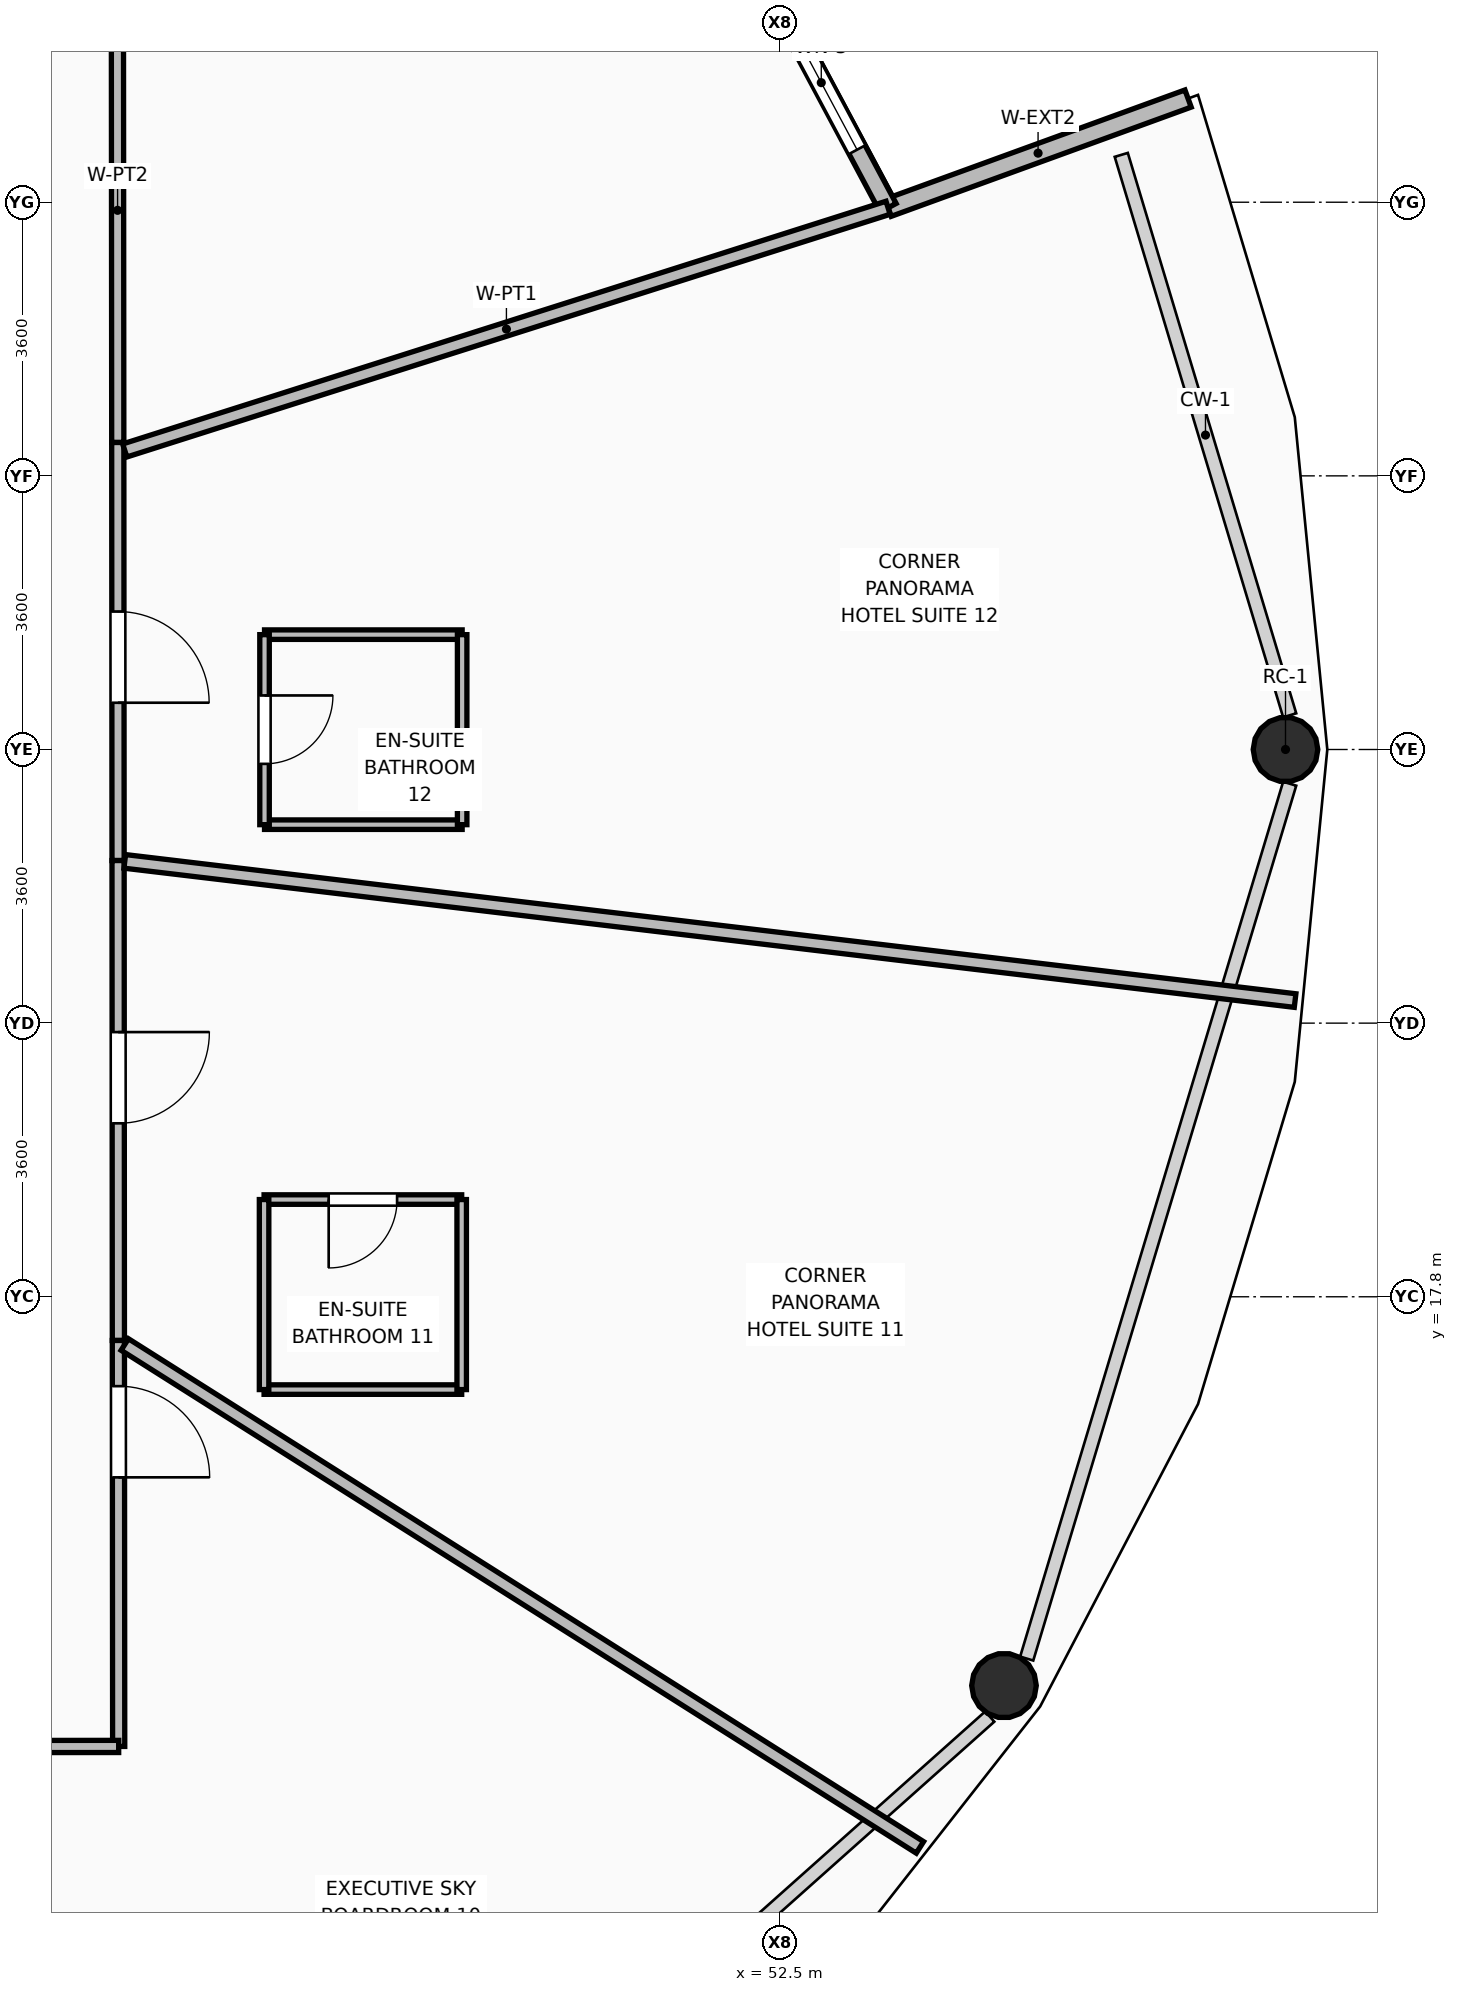
"""IFC4 building model, lengths in metres.
Left out: names, types, materials, properties, quantities, classifications, styles, units other than length and angle.
Written with IfcOpenShell. Run it as: python <this file> out.ifc"""

import sys

from ifc_helpers import new_model, si_unit, direction, frame, frame_2d, origin, origin_2d, place, context, subcontext, project, spatial, rectangle, hollow_circle, extrude, element, fill, save


model = new_model("IFC4")
c1 = context("Model", 3, precision=1e-05, world=origin(), true_north=direction((0.0, 1.0)))
c2 = subcontext(c1, "Body", "Model", "MODEL_VIEW")
j1 = project(units=[si_unit("LENGTHUNIT", "METRE"), si_unit("PLANEANGLEUNIT", "RADIAN")], contexts=[c1])
p1 = place(None, origin())
s1 = spatial("IfcSite", under=j1, at=p1, CompositionType="ELEMENT")
p2 = place(p1, origin())
s2 = spatial("IfcBuilding", under=s1, at=p2, CompositionType="ELEMENT")
p3 = place(p2, frame((0.0, 0.0, 75.75)))
s3 = spatial("IfcBuildingStorey", under=s2, at=p3, CompositionType="ELEMENT", Elevation=75.75)
p4 = place(p3, frame((59.15, 25.0, 0.0), z_axis=(-0.041951682921, 0.0, 0.999119640634), x_axis=(0.0, -1.0, 0.0)))
e1 = element("IfcColumn", 1, at=p4, inside=s3, PredefinedType="COLUMN", context=c2, shape_type="SweptSolid", body=[
    extrude(hollow_circle(Radius=0.425, WallThickness=0.04, at=origin_2d()), origin(), (0.0, 0.0, 1.0), 3.573),
])
p5 = place(p3, frame((55.446, 12.685, 0.0), z_axis=(-0.03641885619, 0.018721888548, 0.999161227132), x_axis=(-0.457197196227, -0.889365348865, 0.0)))
e2 = element("IfcColumn", 2, at=p5, inside=s3, PredefinedType="COLUMN", context=c2, shape_type="SweptSolid", body=[
    extrude(hollow_circle(Radius=0.425, WallThickness=0.04, at=origin_2d()), origin(), (0.0, 0.0, 1.0), 3.573),
])
p6 = place(p3, frame((57.868, 33.564, 0.0), z_axis=(0.0, 0.0, 1.0), x_axis=(-0.939660987195, -0.342107043399, 0.0)))
e3 = element("IfcWall", 3, at=p6, inside=s3, PredefinedType="SOLIDWALL", context=c2, shape_type="SweptSolid", body=[
    extrude(rectangle(XDim=4.2, YDim=0.24, at=frame_2d((2.1, 0.0))), origin(), (0.0, 0.0, 1.0), 3.57),
])
p7 = place(p3, frame((53.921, 32.127, 0.0), z_axis=(0.0, 0.0, 1.0), x_axis=(-0.471022801321, 0.88212103514, 0.0)))
e4 = element("IfcWall", 4, at=p7, inside=s3, PredefinedType="SOLIDWALL", context=c2, shape_type="SweptSolid", body=[
    extrude(rectangle(XDim=3.732, YDim=0.24, at=frame_2d((1.866, 0.0))), origin(), (0.0, 0.0, 1.0), 3.57),
])
p8 = place(p7, frame((0.866, 0.0, 0.85)))
e5 = element("IfcOpeningElement", 5, at=p8, cuts=e4, PredefinedType="OPENING", context=c2, shape_type="SweptSolid", body=[
    extrude(rectangle(XDim=2.0, YDim=2.4, at=frame_2d((1.0, 1.2))), frame((0.0, 0.13, 0.0), z_axis=(0.0, -1.0, 0.0), x_axis=(1.0, 0.0, 0.0)), (0.0, 0.0, 1.0), 0.26),
])
p9 = place(p3, frame((43.781, 35.148, 0.0), z_axis=(0.0, 0.0, 1.0), x_axis=(0.000799296364, -0.999999680563, 0.0)))
e6 = element("IfcWall", 6, at=p9, inside=s3, PredefinedType="PARTITIONING", context=c2, shape_type="SweptSolid", body=[
    extrude(rectangle(XDim=6.109, YDim=0.16, at=frame_2d((3.054, 0.0))), origin(), (0.0, 0.0, 1.0), 2.928),
])
p10 = place(p3, frame((43.786, 29.039, 0.0), z_axis=(0.0, 0.0, 1.0), x_axis=(0.000754616262, -0.999999715277, 0.0)))
e7 = element("IfcWall", 7, at=p10, inside=s3, PredefinedType="PARTITIONING", context=c2, shape_type="SweptSolid", body=[
    extrude(rectangle(XDim=5.5, YDim=0.16, at=frame_2d((2.75, 0.0))), origin(), (0.0, 0.0, 1.0), 3.55),
])
p11 = place(p10, frame((2.224, 0.0, 0.0)))
e8 = element("IfcOpeningElement", 8, at=p11, cuts=e7, PredefinedType="OPENING", context=c2, shape_type="SweptSolid", body=[
    extrude(rectangle(XDim=1.2, YDim=2.1, at=frame_2d((0.6, 1.05))), frame((0.0, 0.09, 0.0), z_axis=(0.0, -1.0, 0.0), x_axis=(1.0, 0.0, 0.0)), (0.0, 0.0, 1.0), 0.18),
])
p12 = place(p3, frame((43.79, 23.539, 0.0), z_axis=(0.0, 0.0, 1.0), x_axis=(0.000618668198, -0.999999808625, 0.0)))
e9 = element("IfcWall", 9, at=p12, inside=s3, PredefinedType="PARTITIONING", context=c2, shape_type="SweptSolid", body=[
    extrude(rectangle(XDim=6.314, YDim=0.16, at=frame_2d((3.157, 0.0))), origin(), (0.0, 0.0, 1.0), 2.928),
])
p13 = place(p12, frame((2.257, 0.0, 0.0)))
e10 = element("IfcOpeningElement", 10, at=p13, cuts=e9, PredefinedType="OPENING", context=c2, shape_type="SweptSolid", body=[
    extrude(rectangle(XDim=1.2, YDim=2.1, at=frame_2d((0.6, 1.05))), frame((0.0, 0.09, 0.0), z_axis=(0.0, -1.0, 0.0), x_axis=(1.0, 0.0, 0.0)), (0.0, 0.0, 1.0), 0.18),
])
p14 = place(p3, frame((43.794, 17.225, 0.0), z_axis=(0.0, 0.0, 1.0), x_axis=(0.000777071576, -0.99999969808, 0.0)))
e11 = element("IfcWall", 11, at=p14, inside=s3, PredefinedType="PARTITIONING", context=c2, shape_type="SweptSolid", body=[
    extrude(rectangle(XDim=5.341, YDim=0.16, at=frame_2d((2.67, 0.0))), origin(), (0.0, 0.0, 1.0), 2.928),
])
p15 = place(p14, frame((0.601, 0.0, 0.0)))
e12 = element("IfcOpeningElement", 12, at=p15, cuts=e11, PredefinedType="OPENING", context=c2, shape_type="SweptSolid", body=[
    extrude(rectangle(XDim=1.2, YDim=2.1, at=frame_2d((0.6, 1.05))), frame((0.0, 0.09, 0.0), z_axis=(0.0, -1.0, 0.0), x_axis=(1.0, 0.0, 0.0)), (0.0, 0.0, 1.0), 0.18),
])
p16 = place(p3, frame((43.798, 11.884, 0.0), z_axis=(0.0, 0.0, 1.0), x_axis=(-0.999999794312, -0.000641385261, 0.0)))
e13 = element("IfcWall", 13, at=p16, inside=s3, PredefinedType="PARTITIONING", context=c2, shape_type="SweptSolid", body=[
    extrude(rectangle(XDim=3.045, YDim=0.16, at=frame_2d((1.522, 0.0))), origin(), (0.0, 0.0, 1.0), 2.928),
])
p17 = place(p3, frame((43.878, 28.934, 0.0), z_axis=(0.0, 0.0, 1.0), x_axis=(0.95299755794, 0.302977977021, 0.0)))
e14 = element("IfcWall", 14, at=p17, inside=s3, PredefinedType="PARTITIONING", context=c2, shape_type="SweptSolid", body=[
    extrude(rectangle(XDim=10.538, YDim=0.18, at=frame_2d((5.269, 0.0))), origin(), (0.0, 0.0, 1.0), 3.55),
])
p18 = place(p3, frame((40.82, 11.788, 0.0), z_axis=(0.0, 0.0, 1.0), x_axis=(0.576393717645, -0.817172125234, 0.0)))
e15 = element("IfcWall", 15, at=p18, inside=s3, PredefinedType="PARTITIONING", context=c2, shape_type="SweptSolid", body=[
    extrude(rectangle(XDim=9.736, YDim=0.18, at=frame_2d((4.868, 0.0))), origin(), (0.0, 0.0, 1.0), 2.775),
])
p19 = place(p3, frame((43.878, 17.172, 0.0), z_axis=(0.0, 0.0, 1.0), x_axis=(0.845177570146, -0.534485617132, 0.0)))
e16 = element("IfcWall", 16, at=p19, inside=s3, PredefinedType="PARTITIONING", context=c2, shape_type="SweptSolid", body=[
    extrude(rectangle(XDim=12.379, YDim=0.18, at=frame_2d((6.189, 0.0))), origin(), (0.0, 0.0, 1.0), 2.775),
])
p20 = place(p3, frame((43.878, 23.528, 0.0), z_axis=(0.0, 0.0, 1.0), x_axis=(0.993003667009, -0.118083518354, 0.0)))
e17 = element("IfcWall", 17, at=p20, inside=s3, PredefinedType="PARTITIONING", context=c2, shape_type="SweptSolid", body=[
    extrude(rectangle(XDim=15.506, YDim=0.18, at=frame_2d((7.753, 0.0))), origin(), (0.0, 0.0, 1.0), 2.775),
])
p21 = place(p3, frame((45.711, 16.579, 0.0), z_axis=(0.0, 0.0, 1.0), x_axis=(1.0, 0.0, 0.0)))
e18 = element("IfcWall", 18, at=p21, inside=s3, PredefinedType="PARTITIONING", context=c2, shape_type="SweptSolid", body=[
    extrude(rectangle(XDim=2.6, YDim=0.125, at=frame_2d((1.3, 0.0))), origin(), (0.0, 0.0, 1.0), 3.55),
])
p22 = place(p3, frame((45.711, 19.079, 0.0), z_axis=(0.0, 0.0, 1.0), x_axis=(1.0, 0.0, 0.0)))
e19 = element("IfcWall", 19, at=p22, inside=s3, PredefinedType="PARTITIONING", context=c2, shape_type="SweptSolid", body=[
    extrude(rectangle(XDim=2.6, YDim=0.125, at=frame_2d((1.3, 0.0))), origin(), (0.0, 0.0, 1.0), 3.55),
])
p23 = place(p22, frame((0.85, 0.0, 0.0)))
e20 = element("IfcOpeningElement", 20, at=p23, cuts=e19, PredefinedType="OPENING", context=c2, shape_type="SweptSolid", body=[
    extrude(rectangle(XDim=0.9, YDim=2.1, at=frame_2d((0.45, 1.05))), frame((0.0, 0.073, 0.0), z_axis=(0.0, -1.0, 0.0), x_axis=(1.0, 0.0, 0.0)), (0.0, 0.0, 1.0), 0.145),
])
for number, where, z_axis, x_axis in (
    (21, (45.711, 16.579, 0.0), (0.0, 0.0, 1.0), (0.0, 1.0, 0.0)),
    (22, (48.311, 16.579, 0.0), (0.0, 0.0, 1.0), (0.0, 1.0, 0.0)),
):
    element("IfcWall", number, at=place(p3, frame(where, z_axis=z_axis, x_axis=x_axis)), inside=s3, PredefinedType="PARTITIONING", context=c2, shape_type="SweptSolid", body=[
        extrude(rectangle(XDim=2.5, YDim=0.125, at=frame_2d((1.25, 0.0))), origin(), (0.0, 0.0, 1.0), 3.55),
    ])
for number, where, z_axis, x_axis in (
    (23, (45.717, 24.011, 0.0), (0.0, 0.0, 1.0), (1.0, 0.0, 0.0)),
    (24, (45.717, 26.511, 0.0), (0.0, 0.0, 1.0), (1.0, 0.0, 0.0)),
):
    element("IfcWall", number, at=place(p3, frame(where, z_axis=z_axis, x_axis=x_axis)), inside=s3, PredefinedType="PARTITIONING", context=c2, shape_type="SweptSolid", body=[
        extrude(rectangle(XDim=2.6, YDim=0.125, at=frame_2d((1.3, 0.0))), origin(), (0.0, 0.0, 1.0), 3.55),
    ])
p24 = place(p3, frame((45.717, 24.011, 0.0), z_axis=(0.0, 0.0, 1.0), x_axis=(0.0, 1.0, 0.0)))
e25 = element("IfcWall", 25, at=p24, inside=s3, PredefinedType="PARTITIONING", context=c2, shape_type="SweptSolid", body=[
    extrude(rectangle(XDim=2.5, YDim=0.125, at=frame_2d((1.25, 0.0))), origin(), (0.0, 0.0, 1.0), 3.55),
])
p25 = place(p24, frame((0.8, 0.0, 0.0)))
e26 = element("IfcOpeningElement", 26, at=p25, cuts=e25, PredefinedType="OPENING", context=c2, shape_type="SweptSolid", body=[
    extrude(rectangle(XDim=0.9, YDim=2.1, at=frame_2d((0.45, 1.05))), frame((0.0, 0.073, 0.0), z_axis=(0.0, -1.0, 0.0), x_axis=(1.0, 0.0, 0.0)), (0.0, 0.0, 1.0), 0.145),
])
p26 = place(p3, frame((48.317, 24.011, 0.0), z_axis=(0.0, 0.0, 1.0), x_axis=(0.0, 1.0, 0.0)))
e27 = element("IfcWall", 27, at=p26, inside=s3, PredefinedType="PARTITIONING", context=c2, shape_type="SweptSolid", body=[
    extrude(rectangle(XDim=2.5, YDim=0.125, at=frame_2d((1.25, 0.0))), origin(), (0.0, 0.0, 1.0), 3.55),
])
p27 = place(p8, origin())
e28 = element("IfcWindow", 28, at=p27, inside=s3, PartitioningType="SINGLE_PANEL", PredefinedType="WINDOW", context=c2, shape_type="SweptSolid", body=[
    extrude(rectangle(XDim=2.0, YDim=2.4, at=frame_2d((1.0, 1.2))), frame((0.0, 0.03, 0.0), z_axis=(0.0, -1.0, 0.0), x_axis=(1.0, 0.0, 0.0)), (0.0, 0.0, 1.0), 0.06),
])
fill(e5, e28)
p28 = place(p15, origin())
e29 = element("IfcDoor", 29, at=p28, inside=s3, OperationType="SINGLE_SWING_RIGHT", PredefinedType="DOOR", context=c2, shape_type="SweptSolid", body=[
    extrude(rectangle(XDim=1.2, YDim=2.1, at=frame_2d((0.6, 1.05))), frame((0.0, 0.025, 0.0), z_axis=(0.0, -1.0, 0.0), x_axis=(1.0, 0.0, 0.0)), (0.0, 0.0, 1.0), 0.05),
])
fill(e12, e29)
p29 = place(p23, frame((0.9, 0.0, 0.0), z_axis=(0.0, 0.0, 1.0), x_axis=(-1.0, 0.0, 0.0)))
e30 = element("IfcDoor", 30, at=p29, inside=s3, OperationType="SINGLE_SWING_RIGHT", PredefinedType="DOOR", context=c2, shape_type="SweptSolid", body=[
    extrude(rectangle(XDim=0.9, YDim=2.1, at=frame_2d((0.45, 1.05))), frame((0.0, 0.025, 0.0), z_axis=(0.0, -1.0, 0.0), x_axis=(1.0, 0.0, 0.0)), (0.0, 0.0, 1.0), 0.05),
])
fill(e20, e30)
p30 = place(p13, origin())
e31 = element("IfcDoor", 31, at=p30, inside=s3, OperationType="SINGLE_SWING_LEFT", PredefinedType="DOOR", context=c2, shape_type="SweptSolid", body=[
    extrude(rectangle(XDim=1.2, YDim=2.1, at=frame_2d((0.6, 1.05))), frame((0.0, 0.025, 0.0), z_axis=(0.0, -1.0, 0.0), x_axis=(1.0, 0.0, 0.0)), (0.0, 0.0, 1.0), 0.05),
])
fill(e10, e31)
p31 = place(p25, frame((0.9, 0.0, 0.0), z_axis=(0.0, 0.0, 1.0), x_axis=(-1.0, 0.0, 0.0)))
e32 = element("IfcDoor", 32, at=p31, inside=s3, OperationType="SINGLE_SWING_LEFT", PredefinedType="DOOR", context=c2, shape_type="SweptSolid", body=[
    extrude(rectangle(XDim=0.9, YDim=2.1, at=frame_2d((0.45, 1.05))), frame((0.0, 0.025, 0.0), z_axis=(0.0, -1.0, 0.0), x_axis=(1.0, 0.0, 0.0)), (0.0, 0.0, 1.0), 0.05),
])
fill(e26, e32)
p32 = place(p11, origin())
e33 = element("IfcDoor", 33, at=p32, inside=s3, OperationType="SINGLE_SWING_RIGHT", PredefinedType="DOOR", context=c2, shape_type="SweptSolid", body=[
    extrude(rectangle(XDim=1.2, YDim=2.1, at=frame_2d((0.6, 1.05))), frame((0.0, 0.025, 0.0), z_axis=(0.0, -1.0, 0.0), x_axis=(1.0, 0.0, 0.0)), (0.0, 0.0, 1.0), 0.05),
])
fill(e8, e33)
save(model, sys.argv[1])
